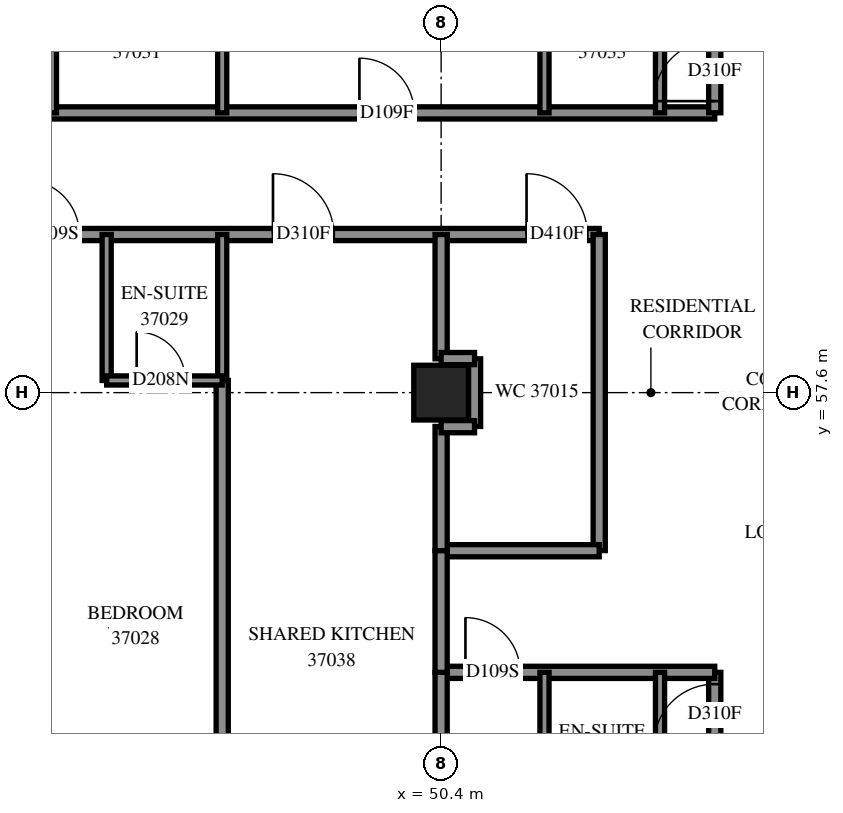
"""IFC4 building model, lengths in metres.
Left out: names, types, materials, properties, quantities, classifications, styles, units other than length and angle.
Written with IfcOpenShell. Run it as: python <this file> out.ifc"""

import sys

from ifc_helpers import new_model, si_unit, direction, frame, frame_2d, origin, origin_2d, place, context, subcontext, project, spatial, rectangle, extrude, element, fill, save


model = new_model("IFC4")
c1 = context("Model", 3, precision=1e-05, world=origin(), true_north=direction((0.0, 1.0)))
c2 = subcontext(c1, "Body", "Model", "MODEL_VIEW")
j1 = project(units=[si_unit("LENGTHUNIT", "METRE"), si_unit("PLANEANGLEUNIT", "RADIAN")], contexts=[c1])
p1 = place(None, origin())
s1 = spatial("IfcSite", under=j1, at=p1, CompositionType="ELEMENT")
p2 = place(p1, origin())
s2 = spatial("IfcBuilding", under=s1, at=p2, CompositionType="ELEMENT")
p3 = place(p2, frame((0.0, 0.0, 138.8)))
s3 = spatial("IfcBuildingStorey", under=s2, at=p3, CompositionType="ELEMENT", Elevation=138.8)
p4 = place(p3, frame((50.4, 57.6, 0.0), z_axis=(0.0, 0.0, 1.0), x_axis=(1.0, 0.0, 0.0)))
e1 = element("IfcColumn", 1, at=p4, inside=s3, PredefinedType="COLUMN", context=c2, shape_type="SweptSolid", body=[
    extrude(rectangle(XDim=0.9, YDim=0.9, at=origin_2d()), origin(), (0.0, 0.0, 1.0), 3.1),
])
p5 = place(p3, frame((36.0, 60.2, 0.0), z_axis=(0.0, 0.0, 1.0), x_axis=(1.0, 0.0, 0.0)))
e2 = element("IfcWall", 2, at=p5, inside=s3, PredefinedType="PARTITIONING", context=c2, shape_type="SweptSolid", body=[
    extrude(rectangle(XDim=17.0, YDim=0.2, at=frame_2d((8.5, 0.0))), origin(), (0.0, 0.0, 1.0), 3.1),
])
p6 = place(p5, frame((15.805, 0.0, 0.0)))
e3 = element("IfcOpeningElement", 3, at=p6, cuts=e2, PredefinedType="OPENING", context=c2, shape_type="SweptSolid", body=[
    extrude(rectangle(XDim=1.0, YDim=2.1, at=frame_2d((0.5, 1.05))), frame((0.0, 0.11, 0.0), z_axis=(0.0, -1.0, 0.0), x_axis=(1.0, 0.0, 0.0)), (0.0, 0.0, 1.0), 0.22),
])
p7 = place(p5, frame((4.125, 0.0, 0.0)))
e4 = element("IfcOpeningElement", 4, at=p7, cuts=e2, PredefinedType="OPENING", context=c2, shape_type="SweptSolid", body=[
    extrude(rectangle(XDim=1.0, YDim=2.1, at=frame_2d((0.5, 1.05))), frame((0.0, 0.11, 0.0), z_axis=(0.0, -1.0, 0.0), x_axis=(1.0, 0.0, 0.0)), (0.0, 0.0, 1.0), 0.22),
])
p8 = place(p5, frame((7.55, 0.0, 0.0)))
e5 = element("IfcOpeningElement", 5, at=p8, cuts=e2, PredefinedType="OPENING", context=c2, shape_type="SweptSolid", body=[
    extrude(rectangle(XDim=0.9, YDim=2.1, at=frame_2d((0.45, 1.05))), frame((0.0, 0.11, 0.0), z_axis=(0.0, -1.0, 0.0), x_axis=(1.0, 0.0, 0.0)), (0.0, 0.0, 1.0), 0.22),
])
p9 = place(p5, frame((11.635, 0.0, 0.0)))
e6 = element("IfcOpeningElement", 6, at=p9, cuts=e2, PredefinedType="OPENING", context=c2, shape_type="SweptSolid", body=[
    extrude(rectangle(XDim=1.0, YDim=2.1, at=frame_2d((0.5, 1.05))), frame((0.0, 0.11, 0.0), z_axis=(0.0, -1.0, 0.0), x_axis=(1.0, 0.0, 0.0)), (0.0, 0.0, 1.0), 0.22),
])
p10 = place(p3, frame((40.602, 62.2, 0.0), z_axis=(0.0, 0.0, 1.0), x_axis=(1.0, 0.0, 0.0)))
e7 = element("IfcWall", 7, at=p10, inside=s3, PredefinedType="PARTITIONING", context=c2, shape_type="SweptSolid", body=[
    extrude(rectangle(XDim=14.298, YDim=0.2, at=frame_2d((7.149, 0.0))), origin(), (0.0, 0.0, 1.0), 3.1),
])
p11 = place(p10, frame((1.306, 0.0, 0.0)))
e8 = element("IfcOpeningElement", 8, at=p11, cuts=e7, PredefinedType="OPENING", context=c2, shape_type="SweptSolid", body=[
    extrude(rectangle(XDim=0.9, YDim=2.1, at=frame_2d((0.45, 1.05))), frame((0.0, 0.11, 0.0), z_axis=(0.0, -1.0, 0.0), x_axis=(1.0, 0.0, 0.0)), (0.0, 0.0, 1.0), 0.22),
])
p12 = place(p10, frame((8.455, 0.0, 0.0)))
e9 = element("IfcOpeningElement", 9, at=p12, cuts=e7, PredefinedType="OPENING", context=c2, shape_type="SweptSolid", body=[
    extrude(rectangle(XDim=0.9, YDim=2.1, at=frame_2d((0.45, 1.05))), frame((0.0, 0.11, 0.0), z_axis=(0.0, -1.0, 0.0), x_axis=(1.0, 0.0, 0.0)), (0.0, 0.0, 1.0), 0.22),
])
p13 = place(p3, frame((46.8, 49.7, 0.0), z_axis=(0.0, 0.0, 1.0), x_axis=(0.0, 1.0, 0.0)))
e10 = element("IfcWall", 10, at=p13, inside=s3, PredefinedType="PARTITIONING", context=c2, shape_type="SweptSolid", body=[
    extrude(rectangle(XDim=8.1, YDim=0.2, at=frame_2d((4.05, 0.0))), origin(), (0.0, 0.0, 1.0), 3.1),
])
p14 = place(p3, frame((54.9, 47.7, 0.0), z_axis=(0.0, 0.0, 1.0), x_axis=(0.0, 1.0, 0.0)))
e11 = element("IfcWall", 11, at=p14, inside=s3, PredefinedType="PARTITIONING", context=c2, shape_type="SweptSolid", body=[
    extrude(rectangle(XDim=5.3, YDim=0.2, at=frame_2d((2.65, 0.0))), origin(), (0.0, 0.0, 1.0), 3.1),
])
p15 = place(p14, frame((4.106, 0.0, 0.0)))
e12 = element("IfcOpeningElement", 12, at=p15, cuts=e11, PredefinedType="OPENING", context=c2, shape_type="SweptSolid", body=[
    extrude(rectangle(XDim=1.0, YDim=2.1, at=frame_2d((0.5, 1.05))), frame((0.0, 0.11, 0.0), z_axis=(0.0, -1.0, 0.0), x_axis=(1.0, 0.0, 0.0)), (0.0, 0.0, 1.0), 0.22),
])
p16 = place(p3, frame((54.9, 62.202, 0.0), z_axis=(0.0, 0.0, 1.0), x_axis=(0.0, 1.0, 0.0)))
e13 = element("IfcWall", 13, at=p16, inside=s3, PredefinedType="PARTITIONING", context=c2, shape_type="SweptSolid", body=[
    extrude(rectangle(XDim=5.298, YDim=0.2, at=frame_2d((2.649, 0.0))), origin(), (0.0, 0.0, 1.0), 3.1),
])
p17 = place(p16, frame((0.192, 0.0, 0.0)))
e14 = element("IfcOpeningElement", 14, at=p17, cuts=e13, PredefinedType="OPENING", context=c2, shape_type="SweptSolid", body=[
    extrude(rectangle(XDim=1.0, YDim=2.1, at=frame_2d((0.5, 1.05))), frame((0.0, 0.11, 0.0), z_axis=(0.0, -1.0, 0.0), x_axis=(1.0, 0.0, 0.0)), (0.0, 0.0, 1.0), 0.22),
])
p18 = place(p3, frame((53.0, 55.002, 0.0), z_axis=(0.0, 0.0, 1.0), x_axis=(0.0, 1.0, 0.0)))
e15 = element("IfcWall", 15, at=p18, inside=s3, PredefinedType="PARTITIONING", context=c2, shape_type="SweptSolid", body=[
    extrude(rectangle(XDim=5.198, YDim=0.2, at=frame_2d((2.599, 0.0))), origin(), (0.0, 0.0, 1.0), 3.1),
])
p19 = place(p3, frame((50.4, 53.0, 0.0), z_axis=(0.0, 0.0, 1.0), x_axis=(1.0, 0.0, 0.0)))
e16 = element("IfcWall", 16, at=p19, inside=s3, PredefinedType="PARTITIONING", context=c2, shape_type="SweptSolid", body=[
    extrude(rectangle(XDim=4.5, YDim=0.2, at=frame_2d((2.25, 0.0))), origin(), (0.0, 0.0, 1.0), 3.1),
])
p20 = place(p19, frame((0.4, 0.0, 0.0)))
e17 = element("IfcOpeningElement", 17, at=p20, cuts=e16, PredefinedType="OPENING", context=c2, shape_type="SweptSolid", body=[
    extrude(rectangle(XDim=0.9, YDim=2.1, at=frame_2d((0.45, 1.05))), frame((0.0, 0.11, 0.0), z_axis=(0.0, -1.0, 0.0), x_axis=(1.0, 0.0, 0.0)), (0.0, 0.0, 1.0), 0.22),
])
p21 = place(p3, frame((50.4, 55.0, 0.0), z_axis=(0.0, 0.0, 1.0), x_axis=(1.0, 0.0, 0.0)))
e18 = element("IfcWall", 18, at=p21, inside=s3, PredefinedType="PARTITIONING", context=c2, shape_type="SweptSolid", body=[
    extrude(rectangle(XDim=2.6, YDim=0.2, at=frame_2d((1.3, 0.0))), origin(), (0.0, 0.0, 1.0), 3.1),
])
for number, where, z_axis, x_axis in (
    (19, (44.9, 57.8, 0.0), (0.0, 0.0, 1.0), (0.0, 1.0, 0.0)),
    (20, (46.8, 57.8, 0.0), (0.0, 0.0, 1.0), (0.0, 1.0, 0.0)),
    (21, (52.1, 50.6, 0.0), (0.0, 0.0, 1.0), (0.0, 1.0, 0.0)),
    (22, (54.0, 50.6, 0.0), (0.0, 0.0, 1.0), (0.0, 1.0, 0.0)),
    (23, (44.0, 62.2, 0.0), (0.0, 0.0, 1.0), (0.0, 1.0, 0.0)),
    (24, (46.8, 62.2, 0.0), (0.0, 0.0, 1.0), (0.0, 1.0, 0.0)),
    (25, (52.1, 62.2, 0.0), (0.0, 0.0, 1.0), (0.0, 1.0, 0.0)),
    (26, (54.0, 62.2, 0.0), (0.0, 0.0, 1.0), (0.0, 1.0, 0.0)),
):
    element("IfcWall", number, at=place(p3, frame(where, z_axis=z_axis, x_axis=x_axis)), inside=s3, PredefinedType="PARTITIONING", context=c2, shape_type="SweptSolid", body=[
        extrude(rectangle(XDim=2.4, YDim=0.15, at=frame_2d((1.2, 0.0))), origin(), (0.0, 0.0, 1.0), 3.1),
    ])
p22 = place(p3, frame((50.4, 50.85, 0.0), z_axis=(0.0, 0.0, 1.0), x_axis=(0.0, 1.0, 0.0)))
e27 = element("IfcWall", 27, at=p22, inside=s3, PredefinedType="PARTITIONING", context=c2, shape_type="SweptSolid", body=[
    extrude(rectangle(XDim=2.15, YDim=0.2, at=frame_2d((1.075, 0.0))), origin(), (0.0, 0.0, 1.0), 3.1),
])
for number, where, z_axis, x_axis in (
    (28, (50.4, 58.156, 0.0), (0.0, 0.0, 1.0), (0.0, 1.0, 0.0)),
    (29, (50.4, 55.0, 0.0), (0.0, 0.0, 1.0), (0.0, 1.0, 0.0)),
):
    element("IfcWall", number, at=place(p3, frame(where, z_axis=z_axis, x_axis=x_axis)), inside=s3, PredefinedType="PARTITIONING", context=c2, shape_type="SweptSolid", body=[
        extrude(rectangle(XDim=2.044, YDim=0.2, at=frame_2d((1.022, 0.0))), origin(), (0.0, 0.0, 1.0), 3.1),
    ])
p23 = place(p3, frame((50.4, 53.0, 0.0), z_axis=(0.0, 0.0, 1.0), x_axis=(0.0, 1.0, 0.0)))
e30 = element("IfcWall", 30, at=p23, inside=s3, PredefinedType="PARTITIONING", context=c2, shape_type="SweptSolid", body=[
    extrude(rectangle(XDim=2.0, YDim=0.2, at=frame_2d((1.0, 0.0))), origin(), (0.0, 0.0, 1.0), 3.1),
])
p24 = place(p3, frame((44.9, 57.8, 0.0), z_axis=(0.0, 0.0, 1.0), x_axis=(1.0, 0.0, 0.0)))
e31 = element("IfcWall", 31, at=p24, inside=s3, PredefinedType="PARTITIONING", context=c2, shape_type="SweptSolid", body=[
    extrude(rectangle(XDim=1.9, YDim=0.15, at=frame_2d((0.95, 0.0))), origin(), (0.0, 0.0, 1.0), 3.1),
])
p25 = place(p24, frame((0.493, 0.0, 0.0)))
e32 = element("IfcOpeningElement", 32, at=p25, cuts=e31, PredefinedType="OPENING", context=c2, shape_type="SweptSolid", body=[
    extrude(rectangle(XDim=0.8, YDim=2.1, at=frame_2d((0.4, 1.05))), frame((0.0, 0.085, 0.0), z_axis=(0.0, -1.0, 0.0), x_axis=(1.0, 0.0, 0.0)), (0.0, 0.0, 1.0), 0.17),
])
p26 = place(p3, frame((50.95, 57.044, 0.0), z_axis=(0.0, 0.0, 1.0), x_axis=(0.0, 1.0, 0.0)))
e33 = element("IfcWall", 33, at=p26, inside=s3, PredefinedType="PARTITIONING", context=c2, shape_type="SweptSolid", body=[
    extrude(rectangle(XDim=1.112, YDim=0.2, at=frame_2d((0.556, 0.0))), origin(), (0.0, 0.0, 1.0), 3.1),
])
for number, where, z_axis, x_axis in (
    (34, (50.4, 57.04, 0.0), (0.0, 0.0, 1.0), (1.0, 0.0, 0.0)),
    (35, (50.4, 58.16, 0.0), (0.0, 0.0, 1.0), (1.0, 0.0, 0.0)),
):
    element("IfcWall", number, at=place(p3, frame(where, z_axis=z_axis, x_axis=x_axis)), inside=s3, PredefinedType="PARTITIONING", context=c2, shape_type="SweptSolid", body=[
        extrude(rectangle(XDim=0.55, YDim=0.2, at=frame_2d((0.275, 0.0))), origin(), (0.0, 0.0, 1.0), 3.1),
    ])
p27 = place(p6, origin())
e36 = element("IfcDoor", 36, at=p27, inside=s3, OperationType="SINGLE_SWING_LEFT", PredefinedType="DOOR", context=c2, shape_type="SweptSolid", body=[
    extrude(rectangle(XDim=1.0, YDim=2.1, at=frame_2d((0.5, 1.05))), frame((0.0, 0.025, 0.0), z_axis=(0.0, -1.0, 0.0), x_axis=(1.0, 0.0, 0.0)), (0.0, 0.0, 1.0), 0.05),
])
fill(e3, e36)
p28 = place(p8, origin())
e37 = element("IfcDoor", 37, at=p28, inside=s3, OperationType="SINGLE_SWING_LEFT", PredefinedType="DOOR", context=c2, shape_type="SweptSolid", body=[
    extrude(rectangle(XDim=0.9, YDim=2.1, at=frame_2d((0.45, 1.05))), frame((0.0, 0.025, 0.0), z_axis=(0.0, -1.0, 0.0), x_axis=(1.0, 0.0, 0.0)), (0.0, 0.0, 1.0), 0.05),
])
fill(e5, e37)
p29 = place(p25, origin())
e38 = element("IfcDoor", 38, at=p29, inside=s3, OperationType="SINGLE_SWING_RIGHT", PredefinedType="DOOR", context=c2, shape_type="SweptSolid", body=[
    extrude(rectangle(XDim=0.8, YDim=2.1, at=frame_2d((0.4, 1.05))), frame((0.0, 0.025, 0.0), z_axis=(0.0, -1.0, 0.0), x_axis=(1.0, 0.0, 0.0)), (0.0, 0.0, 1.0), 0.05),
])
fill(e32, e38)
p30 = place(p12, origin())
e39 = element("IfcDoor", 39, at=p30, inside=s3, OperationType="SINGLE_SWING_LEFT", PredefinedType="DOOR", context=c2, shape_type="SweptSolid", body=[
    extrude(rectangle(XDim=0.9, YDim=2.1, at=frame_2d((0.45, 1.05))), frame((0.0, 0.025, 0.0), z_axis=(0.0, -1.0, 0.0), x_axis=(1.0, 0.0, 0.0)), (0.0, 0.0, 1.0), 0.05),
])
fill(e9, e39)
p31 = place(p17, origin())
e40 = element("IfcDoor", 40, at=p31, inside=s3, OperationType="SINGLE_SWING_LEFT", PredefinedType="DOOR", context=c2, shape_type="SweptSolid", body=[
    extrude(rectangle(XDim=1.0, YDim=2.1, at=frame_2d((0.5, 1.05))), frame((0.0, 0.025, 0.0), z_axis=(0.0, -1.0, 0.0), x_axis=(1.0, 0.0, 0.0)), (0.0, 0.0, 1.0), 0.05),
])
fill(e14, e40)
p32 = place(p9, origin())
e41 = element("IfcDoor", 41, at=p32, inside=s3, OperationType="SINGLE_SWING_RIGHT", PredefinedType="DOOR", context=c2, shape_type="SweptSolid", body=[
    extrude(rectangle(XDim=1.0, YDim=2.1, at=frame_2d((0.5, 1.05))), frame((0.0, 0.025, 0.0), z_axis=(0.0, -1.0, 0.0), x_axis=(1.0, 0.0, 0.0)), (0.0, 0.0, 1.0), 0.05),
])
fill(e6, e41)
p33 = place(p20, origin())
e42 = element("IfcDoor", 42, at=p33, inside=s3, OperationType="SINGLE_SWING_LEFT", PredefinedType="DOOR", context=c2, shape_type="SweptSolid", body=[
    extrude(rectangle(XDim=0.9, YDim=2.1, at=frame_2d((0.45, 1.05))), frame((0.0, 0.025, 0.0), z_axis=(0.0, -1.0, 0.0), x_axis=(1.0, 0.0, 0.0)), (0.0, 0.0, 1.0), 0.05),
])
fill(e17, e42)
p34 = place(p15, origin())
e43 = element("IfcDoor", 43, at=p34, inside=s3, OperationType="SINGLE_SWING_RIGHT", PredefinedType="DOOR", context=c2, shape_type="SweptSolid", body=[
    extrude(rectangle(XDim=1.0, YDim=2.1, at=frame_2d((0.5, 1.05))), frame((0.0, 0.025, 0.0), z_axis=(0.0, -1.0, 0.0), x_axis=(1.0, 0.0, 0.0)), (0.0, 0.0, 1.0), 0.05),
])
fill(e12, e43)
save(model, sys.argv[1])
